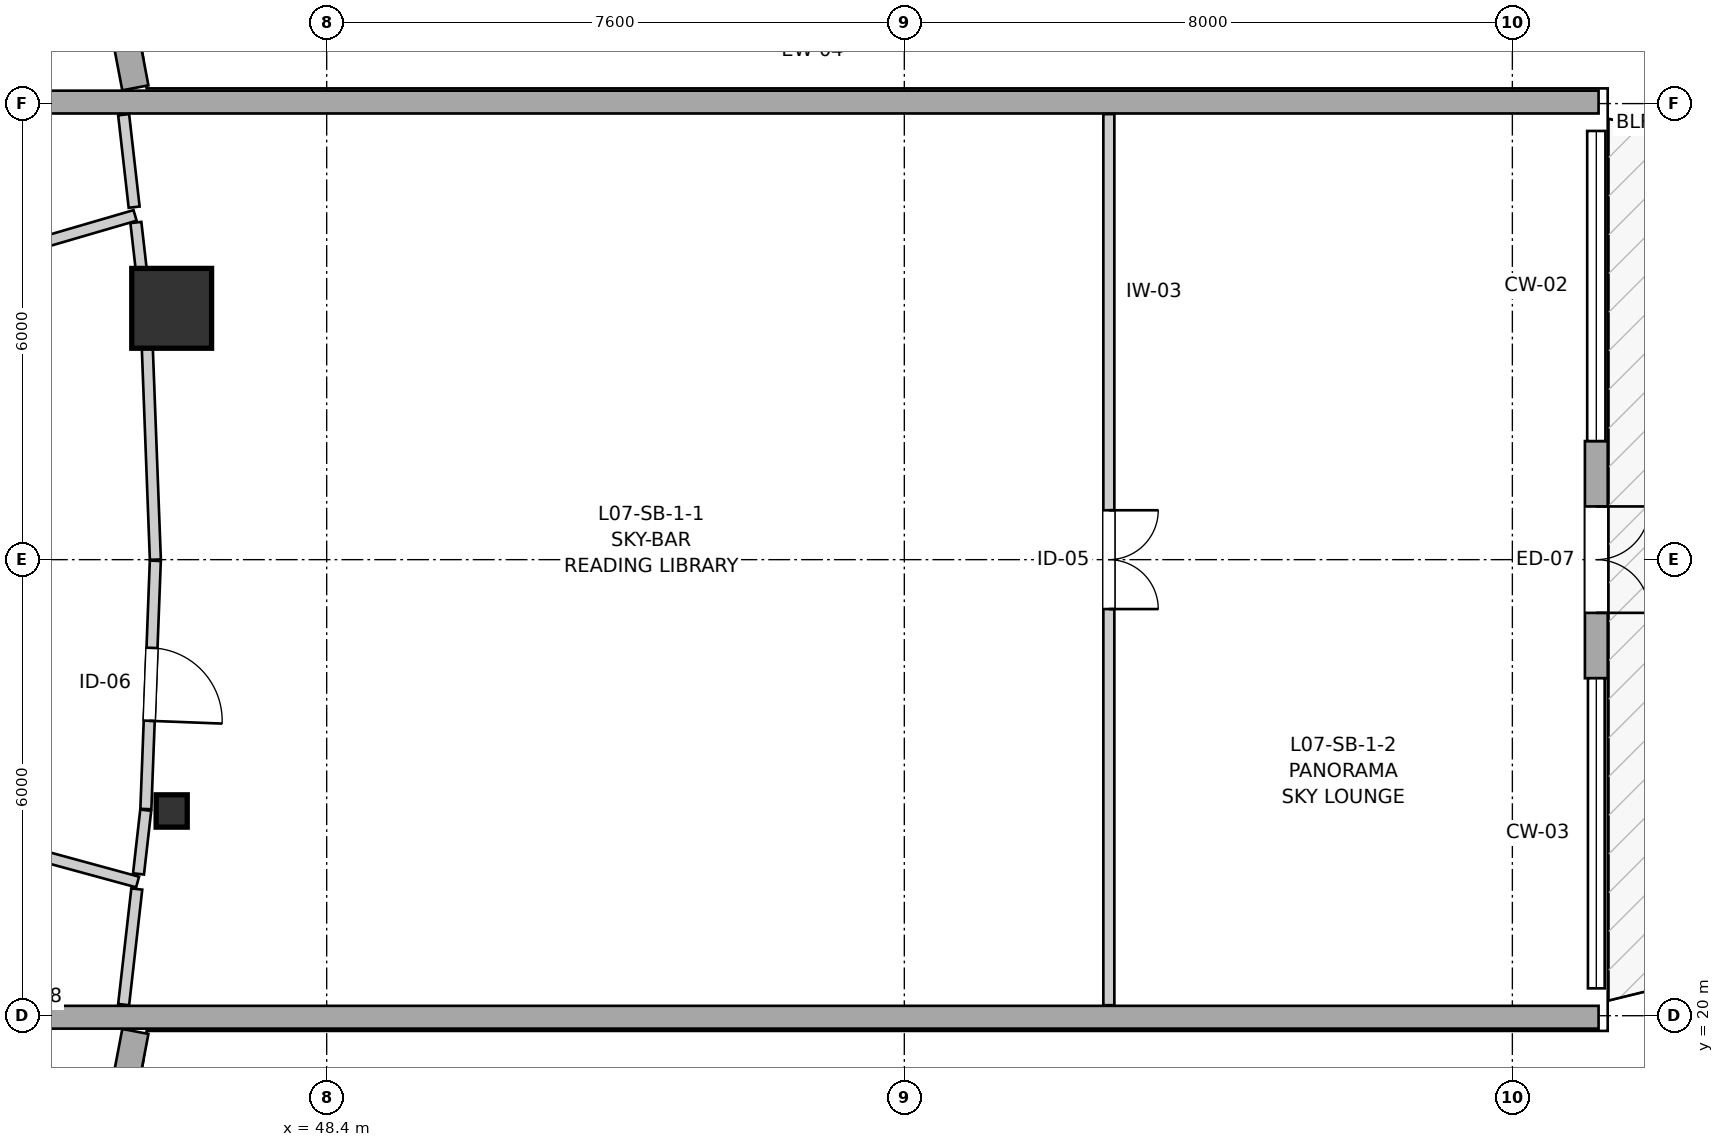
"""IFC4 building model, lengths in metres.
Left out: names, types, materials, properties, quantities, classifications, styles, units other than length and angle.
Written with IfcOpenShell. Run it as: python <this file> out.ifc"""

import sys

from ifc_helpers import new_model, si_unit, direction, frame, frame_2d, origin, origin_2d, place, context, subcontext, project, spatial, rectangle, i_section, extrude, source, transform, mapped, element, fill, save


model = new_model("IFC4")
c1 = context("Model", 3, precision=1e-05, world=origin(), true_north=direction((0.0, 1.0)))
c2 = subcontext(c1, "Body", "Model", "MODEL_VIEW")
j1 = project(units=[si_unit("LENGTHUNIT", "METRE"), si_unit("PLANEANGLEUNIT", "RADIAN")], contexts=[c1])
p1 = place(None, origin())
s1 = spatial("IfcSite", under=j1, at=p1, CompositionType="ELEMENT")
p2 = place(p1, origin())
s2 = spatial("IfcBuilding", under=s1, at=p2, CompositionType="ELEMENT")
p3 = place(p2, frame((0.0, 0.0, 27.0)))
s3 = spatial("IfcBuildingStorey", under=s2, at=p3, CompositionType="ELEMENT", Elevation=27.0)
m1 = source(origin(), c2, "Body", "SweptSolid", [
    extrude(i_section(OverallWidth=0.409, OverallDepth=0.425, WebThickness=0.03, FlangeThickness=0.048, FilletRadius=0.015, at=origin_2d()), origin(), (0.0, 0.0, 1.0), 2.935),
])
p4 = place(p3, frame((46.361, 22.694, 0.0), z_axis=(0.0, 0.0, 1.0), x_axis=(1.0, 0.0, 0.0)))
e1 = element("IfcColumn", 1, at=p4, inside=s3, PredefinedType="PILASTER", context=c2, shape_type="MappedRepresentation", body=[
    mapped(m1, transform((0.0, 0.0, 0.0), x_axis=(1.0, 0.0, 0.0), y_axis=(0.0, 1.0, 0.0), z_axis=(0.0, 0.0, 1.0), scale=1.0)),
])
m2 = source(origin(), c2, "Body", "SweptSolid", [
    extrude(rectangle(XDim=1.05, YDim=1.05, at=origin_2d()), origin(), (0.0, 0.0, 1.0), 2.935),
])
p5 = place(p3, frame((46.361, 29.306, 0.0), z_axis=(0.0, 0.0, 1.0), x_axis=(1.0, 0.0, 0.0)))
e2 = element("IfcColumn", 2, at=p5, inside=s3, PredefinedType="COLUMN", context=c2, shape_type="MappedRepresentation", body=[
    mapped(m2, transform((0.0, 0.0, 0.0), x_axis=(1.0, 0.0, 0.0), y_axis=(0.0, 1.0, 0.0), z_axis=(0.0, 0.0, 1.0), scale=1.0)),
])
p6 = place(p3, frame((45.24, 16.408, 0.0), z_axis=(0.0, 0.0, 1.0), x_axis=(0.186636709983, 0.982428999209, 0.0)))
e3 = element("IfcWall", 3, at=p6, inside=s3, PredefinedType="SOLIDWALL", context=c2, shape_type="SweptSolid", body=[
    extrude(rectangle(XDim=3.446, YDim=0.35, at=frame_2d((1.723, 0.0))), origin(), (0.0, 0.0, 1.0), 2.415),
])
p7 = place(p6, frame((0.828, 0.0, 0.82)))
e4 = element("IfcOpeningElement", 4, at=p7, cuts=e3, PredefinedType="OPENING", context=c2, shape_type="SweptSolid", body=[
    extrude(rectangle(XDim=1.45, YDim=1.25, at=frame_2d((0.725, 0.625))), frame((0.0, 0.185, 0.0), z_axis=(0.0, -1.0, 0.0), x_axis=(1.0, 0.0, 0.0)), (0.0, 0.0, 1.0), 0.37),
])
p8 = place(p3, frame((45.883, 32.207, 0.0), z_axis=(0.0, 0.0, 1.0), x_axis=(-0.186693533797, 0.982418202416, 0.0)))
e5 = element("IfcWall", 5, at=p8, inside=s3, PredefinedType="SOLIDWALL", context=c2, shape_type="SweptSolid", body=[
    extrude(rectangle(XDim=3.726, YDim=0.35, at=frame_2d((1.863, 0.0))), origin(), (0.0, 0.0, 1.0), 2.415),
])
p9 = place(p8, frame((1.313, 0.0, 0.82)))
e6 = element("IfcOpeningElement", 6, at=p9, cuts=e5, PredefinedType="OPENING", context=c2, shape_type="SweptSolid", body=[
    extrude(rectangle(XDim=1.45, YDim=1.25, at=frame_2d((0.725, 0.625))), frame((0.0, 0.185, 0.0), z_axis=(0.0, -1.0, 0.0), x_axis=(1.0, 0.0, 0.0)), (0.0, 0.0, 1.0), 0.37),
])
for number, where, z_axis, x_axis in (
    (7, (44.45, 32.02, 0.0), (0.0, 0.0, 1.0), (1.0, 0.0, 0.0)),
    (8, (44.45, 19.98, 0.0), (0.0, 0.0, 1.0), (1.0, 0.0, 0.0)),
):
    element("IfcWall", number, at=place(p3, frame(where, z_axis=z_axis, x_axis=x_axis)), inside=s3, PredefinedType="SOLIDWALL", context=c2, shape_type="SweptSolid", body=[
        extrude(rectangle(XDim=20.685, YDim=0.3, at=frame_2d((10.342, 0.0))), origin(), (0.0, 0.0, 1.0), 2.115),
    ])
p10 = place(p3, frame((65.104, 27.56, 0.0), z_axis=(0.0, 0.0, 1.0), x_axis=(0.0, -1.0, 0.0)))
e9 = element("IfcWall", 9, at=p10, inside=s3, PredefinedType="SOLIDWALL", context=c2, shape_type="SweptSolid", body=[
    extrude(rectangle(XDim=3.12, YDim=0.3, at=frame_2d((1.56, 0.0))), origin(), (0.0, 0.0, 1.0), 2.3),
])
p11 = place(p10, frame((0.86, 0.0, 0.0)))
e10 = element("IfcOpeningElement", 10, at=p11, cuts=e9, PredefinedType="OPENING", context=c2, shape_type="SweptSolid", body=[
    extrude(rectangle(XDim=1.4, YDim=2.15, at=frame_2d((0.7, 1.075))), frame((0.0, 0.16, 0.0), z_axis=(0.0, -1.0, 0.0), x_axis=(1.0, 0.0, 0.0)), (0.0, 0.0, 1.0), 0.32),
])
p12 = place(p3, frame((58.691, 31.862, 0.0), z_axis=(0.0, 0.0, 1.0), x_axis=(0.0, -1.0, 0.0)))
e11 = element("IfcWall", 11, at=p12, inside=s3, PredefinedType="PARTITIONING", context=c2, shape_type="SweptSolid", body=[
    extrude(rectangle(XDim=11.724, YDim=0.145, at=frame_2d((5.862, 0.0))), origin(), (0.0, 0.0, 1.0), 2.353),
])
p13 = place(p12, frame((5.212, 0.0, 0.0)))
e12 = element("IfcOpeningElement", 12, at=p13, cuts=e11, PredefinedType="OPENING", context=c2, shape_type="SweptSolid", body=[
    extrude(rectangle(XDim=1.3, YDim=2.1, at=frame_2d((0.65, 1.05))), frame((0.0, 0.083, 0.0), z_axis=(0.0, -1.0, 0.0), x_axis=(1.0, 0.0, 0.0)), (0.0, 0.0, 1.0), 0.165),
])
p14 = place(p3, frame((46.146, 25.985, 0.0), z_axis=(0.0, 0.0, 1.0), x_axis=(-0.038094618751, -0.999274136572, 0.0)))
e13 = element("IfcWall", 13, at=p14, inside=s3, PredefinedType="PARTITIONING", context=c2, shape_type="SweptSolid", body=[
    extrude(rectangle(XDim=3.269, YDim=0.145, at=frame_2d((1.634, 0.0))), origin(), (0.0, 0.0, 1.0), 2.403),
])
p15 = place(p14, frame((1.147, 0.0, 0.0)))
e14 = element("IfcOpeningElement", 14, at=p15, cuts=e13, PredefinedType="OPENING", context=c2, shape_type="SweptSolid", body=[
    extrude(rectangle(XDim=0.96, YDim=2.1, at=frame_2d((0.48, 1.05))), frame((0.0, 0.083, 0.0), z_axis=(0.0, -1.0, 0.0), x_axis=(1.0, 0.0, 0.0)), (0.0, 0.0, 1.0), 0.165),
])
p16 = place(p3, frame((38.81, 32.306, 0.0), z_axis=(0.0, 0.0, 1.0), x_axis=(0.801799720797, 0.597592844443, 0.0)))
e15 = element("IfcWall", 15, at=p16, inside=s3, PredefinedType="PARTITIONING", context=c2, shape_type="SweptSolid", body=[
    extrude(rectangle(XDim=7.424, YDim=0.145, at=frame_2d((3.712, 0.0))), origin(), (0.0, 0.0, 1.0), 2.935),
])
p17 = place(p3, frame((38.788, 28.46, 0.0), z_axis=(0.0, 0.0, 1.0), x_axis=(0.959983709987, 0.280055845432, 0.0)))
e16 = element("IfcWall", 16, at=p17, inside=s3, PredefinedType="PARTITIONING", context=c2, shape_type="SweptSolid", body=[
    extrude(rectangle(XDim=7.386, YDim=0.145, at=frame_2d((3.693, 0.0))), origin(), (0.0, 0.0, 1.0), 2.935),
])
p18 = place(p3, frame((38.787, 23.701, 0.0), z_axis=(0.0, 0.0, 1.0), x_axis=(0.964810342249, -0.262946769308, 0.0)))
e17 = element("IfcWall", 17, at=p18, inside=s3, PredefinedType="PARTITIONING", context=c2, shape_type="SweptSolid", body=[
    extrude(rectangle(XDim=7.385, YDim=0.145, at=frame_2d((3.692, 0.0))), origin(), (0.0, 0.0, 1.0), 2.935),
])
p19 = place(p3, frame((46.021, 29.281, 0.0), z_axis=(0.0, 0.0, 1.0), x_axis=(0.038070453861, -0.999275057501, 0.0)))
e18 = element("IfcWall", 18, at=p19, inside=s3, PredefinedType="PARTITIONING", context=c2, shape_type="SweptSolid", body=[
    extrude(rectangle(XDim=3.283, YDim=0.145, at=frame_2d((1.642, 0.0))), origin(), (0.0, 0.0, 1.0), 2.403),
])
p20 = place(p3, frame((45.729, 20.146, 0.0), z_axis=(0.0, 0.0, 1.0), x_axis=(0.113074294354, 0.993586535716, 0.0)))
e19 = element("IfcWall", 19, at=p20, inside=s3, PredefinedType="PARTITIONING", context=c2, shape_type="SweptSolid", body=[
    extrude(rectangle(XDim=1.531, YDim=0.145, at=frame_2d((0.765, 0.0))), origin(), (0.0, 0.0, 1.0), 2.403),
])
p21 = place(p3, frame((45.89, 30.436, 0.0), z_axis=(0.0, 0.0, 1.0), x_axis=(0.113024308153, -0.993592223081, 0.0)))
e20 = element("IfcWall", 20, at=p21, inside=s3, PredefinedType="PARTITIONING", context=c2, shape_type="SweptSolid", body=[
    extrude(rectangle(XDim=1.147, YDim=0.145, at=frame_2d((0.573, 0.0))), origin(), (0.0, 0.0, 1.0), 2.403),
])
p22 = place(p3, frame((45.729, 31.854, 0.0), z_axis=(0.0, 0.0, 1.0), x_axis=(0.112860473391, -0.993610846129, 0.0)))
e21 = element("IfcWall", 21, at=p22, inside=s3, PredefinedType="PARTITIONING", context=c2, shape_type="SweptSolid", body=[
    extrude(rectangle(XDim=1.224, YDim=0.145, at=frame_2d((0.612, 0.0))), origin(), (0.0, 0.0, 1.0), 2.403),
])
p23 = place(p3, frame((45.924, 21.866, 0.0), z_axis=(0.0, 0.0, 1.0), x_axis=(0.112844765803, 0.993612630169, 0.0)))
e22 = element("IfcWall", 22, at=p23, inside=s3, PredefinedType="PARTITIONING", context=c2, shape_type="SweptSolid", body=[
    extrude(rectangle(XDim=0.844, YDim=0.145, at=frame_2d((0.422, 0.0))), origin(), (0.0, 0.0, 1.0), 2.403),
])
m3 = source(origin(), c2, "Body", "SweptSolid", [
    extrude(rectangle(XDim=1.4, YDim=2.15, at=frame_2d((0.7, 1.075))), frame((0.0, 0.025, 0.0), z_axis=(0.0, -1.0, 0.0), x_axis=(1.0, 0.0, 0.0)), (0.0, 0.0, 1.0), 0.05),
])
p24 = place(p11, origin())
e23 = element("IfcDoor", 23, at=p24, inside=s3, OperationType="DOUBLE_DOOR_SINGLE_SWING", PredefinedType="DOOR", context=c2, shape_type="MappedRepresentation", body=[
    mapped(m3, transform((0.0, 0.0, 0.0), x_axis=(1.0, 0.0, 0.0), y_axis=(0.0, 1.0, 0.0), z_axis=(0.0, 0.0, 1.0), scale=1.0)),
])
fill(e10, e23)
m4 = source(origin(), c2, "Body", "SweptSolid", [
    extrude(rectangle(XDim=1.3, YDim=2.1, at=frame_2d((0.65, 1.05))), frame((0.0, 0.025, 0.0), z_axis=(0.0, -1.0, 0.0), x_axis=(1.0, 0.0, 0.0)), (0.0, 0.0, 1.0), 0.05),
])
p25 = place(p13, origin())
e24 = element("IfcDoor", 24, at=p25, inside=s3, OperationType="DOUBLE_DOOR_SINGLE_SWING", PredefinedType="DOOR", context=c2, shape_type="MappedRepresentation", body=[
    mapped(m4, transform((0.0, 0.0, 0.0), x_axis=(1.0, 0.0, 0.0), y_axis=(0.0, 1.0, 0.0), z_axis=(0.0, 0.0, 1.0), scale=1.0)),
])
fill(e12, e24)
m5 = source(origin(), c2, "Body", "SweptSolid", [
    extrude(rectangle(XDim=0.96, YDim=2.1, at=frame_2d((0.48, 1.05))), frame((0.0, 0.025, 0.0), z_axis=(0.0, -1.0, 0.0), x_axis=(1.0, 0.0, 0.0)), (0.0, 0.0, 1.0), 0.05),
])
p26 = place(p15, origin())
e25 = element("IfcDoor", 25, at=p26, inside=s3, OperationType="SINGLE_SWING_RIGHT", PredefinedType="DOOR", context=c2, shape_type="MappedRepresentation", body=[
    mapped(m5, transform((0.0, 0.0, 0.0), x_axis=(1.0, 0.0, 0.0), y_axis=(0.0, 1.0, 0.0), z_axis=(0.0, 0.0, 1.0), scale=1.0)),
])
fill(e14, e25)
save(model, sys.argv[1])
